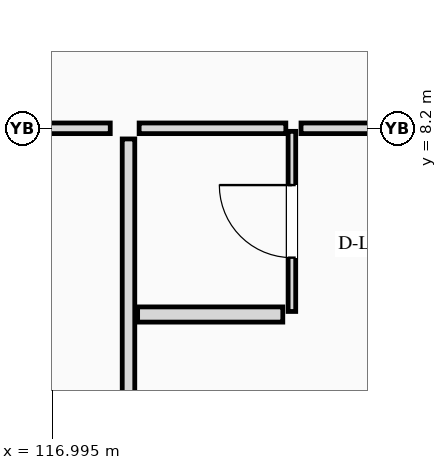
"""IFC4 building model, lengths in metres.
Left out: names, types, materials, properties, quantities, classifications, styles, units other than length and angle.
Written with IfcOpenShell. Run it as: python <this file> out.ifc"""

import sys

from ifc_helpers import new_model, si_unit, direction, frame, frame_2d, origin, place, context, subcontext, project, spatial, rectangle, extrude, element, fill, save


model = new_model("IFC4")
c1 = context("Model", 3, precision=1e-05, world=origin(), true_north=direction((0.0, 1.0)))
c2 = subcontext(c1, "Body", "Model", "MODEL_VIEW")
j1 = project(units=[si_unit("LENGTHUNIT", "METRE"), si_unit("PLANEANGLEUNIT", "RADIAN")], contexts=[c1])
p1 = place(None, origin())
s1 = spatial("IfcSite", under=j1, at=p1, CompositionType="ELEMENT")
p2 = place(p1, origin())
s2 = spatial("IfcBuilding", under=s1, at=p2, CompositionType="ELEMENT")
p3 = place(p2, frame((0.0, 0.0, 37.6)))
s3 = spatial("IfcBuildingStorey", under=s2, at=p3, CompositionType="ELEMENT", Elevation=37.6)
p4 = place(p3, frame((114.57, 8.2, 0.0), z_axis=(0.0, 0.0, 1.0), x_axis=(1.0, 0.0, 0.0)))
e1 = element("IfcWall", 1, at=p4, inside=s3, PredefinedType="PARTITIONING", context=c2, shape_type="SweptSolid", body=[
    extrude(rectangle(XDim=3.19, YDim=0.14, at=frame_2d((1.595, 0.0))), origin(), (0.0, 0.0, 1.0), 2.438),
])
p5 = place(p4, frame((1.105, 0.0, 0.0)))
e2 = element("IfcOpeningElement", 2, at=p5, cuts=e1, PredefinedType="OPENING", context=c2, shape_type="SweptSolid", body=[
    extrude(rectangle(XDim=0.98, YDim=2.2, at=frame_2d((0.49, 1.1))), frame((0.0, 0.08, 0.0), z_axis=(0.0, -1.0, 0.0), x_axis=(1.0, 0.0, 0.0)), (0.0, 0.0, 1.0), 0.16),
])
p6 = place(p3, frame((118.0, -0.31, 0.0), z_axis=(0.0, 0.0, 1.0), x_axis=(0.0, 1.0, 0.0)))
e3 = element("IfcWall", 3, at=p6, inside=s3, PredefinedType="PARTITIONING", context=c2, shape_type="SweptSolid", body=[
    extrude(rectangle(XDim=8.37, YDim=0.165, at=frame_2d((4.185, 0.0))), origin(), (0.0, 0.0, 1.0), 2.438),
])
p7 = place(p3, frame((118.14, 8.2, 0.0), z_axis=(0.0, 0.0, 1.0), x_axis=(1.0, 0.0, 0.0)))
e4 = element("IfcWall", 4, at=p7, inside=s3, PredefinedType="PARTITIONING", context=c2, shape_type="SweptSolid", body=[
    extrude(rectangle(XDim=1.93, YDim=0.14, at=frame_2d((0.965, 0.0))), origin(), (0.0, 0.0, 1.0), 2.438),
])
p8 = place(p3, frame((120.27, 8.2, 0.0), z_axis=(0.0, 0.0, 1.0), x_axis=(1.0, 0.0, 0.0)))
e5 = element("IfcWall", 5, at=p8, inside=s3, PredefinedType="PARTITIONING", context=c2, shape_type="SweptSolid", body=[
    extrude(rectangle(XDim=3.19, YDim=0.14, at=frame_2d((1.595, 0.0))), origin(), (0.0, 0.0, 1.0), 2.438),
])
p9 = place(p8, frame((1.09, 0.0, 0.0)))
e6 = element("IfcOpeningElement", 6, at=p9, cuts=e5, PredefinedType="OPENING", context=c2, shape_type="SweptSolid", body=[
    extrude(rectangle(XDim=1.01, YDim=2.2, at=frame_2d((0.505, 1.1))), frame((0.0, 0.08, 0.0), z_axis=(0.0, -1.0, 0.0), x_axis=(1.0, 0.0, 0.0)), (0.0, 0.0, 1.0), 0.16),
])
p10 = place(p3, frame((120.15, 5.79, 0.0), z_axis=(0.0, 0.0, 1.0), x_axis=(0.0, 1.0, 0.0)))
e7 = element("IfcWall", 7, at=p10, inside=s3, PredefinedType="PARTITIONING", context=c2, shape_type="SweptSolid", body=[
    extrude(rectangle(XDim=2.37, YDim=0.1, at=frame_2d((1.185, 0.0))), origin(), (0.0, 0.0, 1.0), 2.438),
])
p11 = place(p10, frame((0.708, 0.0, 0.0)))
e8 = element("IfcOpeningElement", 8, at=p11, cuts=e7, PredefinedType="OPENING", context=c2, shape_type="SweptSolid", body=[
    extrude(rectangle(XDim=0.955, YDim=2.14, at=frame_2d((0.478, 1.07))), frame((0.0, 0.06, 0.0), z_axis=(0.0, -1.0, 0.0), x_axis=(1.0, 0.0, 0.0)), (0.0, 0.0, 1.0), 0.12),
])
p12 = place(p3, frame((118.12, 5.75, 0.0), z_axis=(0.0, 0.0, 1.0), x_axis=(1.0, 0.0, 0.0)))
e9 = element("IfcWall", 9, at=p12, inside=s3, PredefinedType="PLUMBINGWALL", context=c2, shape_type="SweptSolid", body=[
    extrude(rectangle(XDim=1.91, YDim=0.2, at=frame_2d((0.955, 0.0))), origin(), (0.0, 0.0, 1.0), 3.2),
])
p13 = place(p11, origin())
e10 = element("IfcDoor", 10, at=p13, inside=s3, OperationType="SINGLE_SWING_RIGHT", PredefinedType="DOOR", context=c2, shape_type="SweptSolid", body=[
    extrude(rectangle(XDim=0.955, YDim=2.14, at=frame_2d((0.478, 1.07))), frame((0.0, 0.025, 0.0), z_axis=(0.0, -1.0, 0.0), x_axis=(1.0, 0.0, 0.0)), (0.0, 0.0, 1.0), 0.05),
])
fill(e8, e10)
save(model, sys.argv[1])
